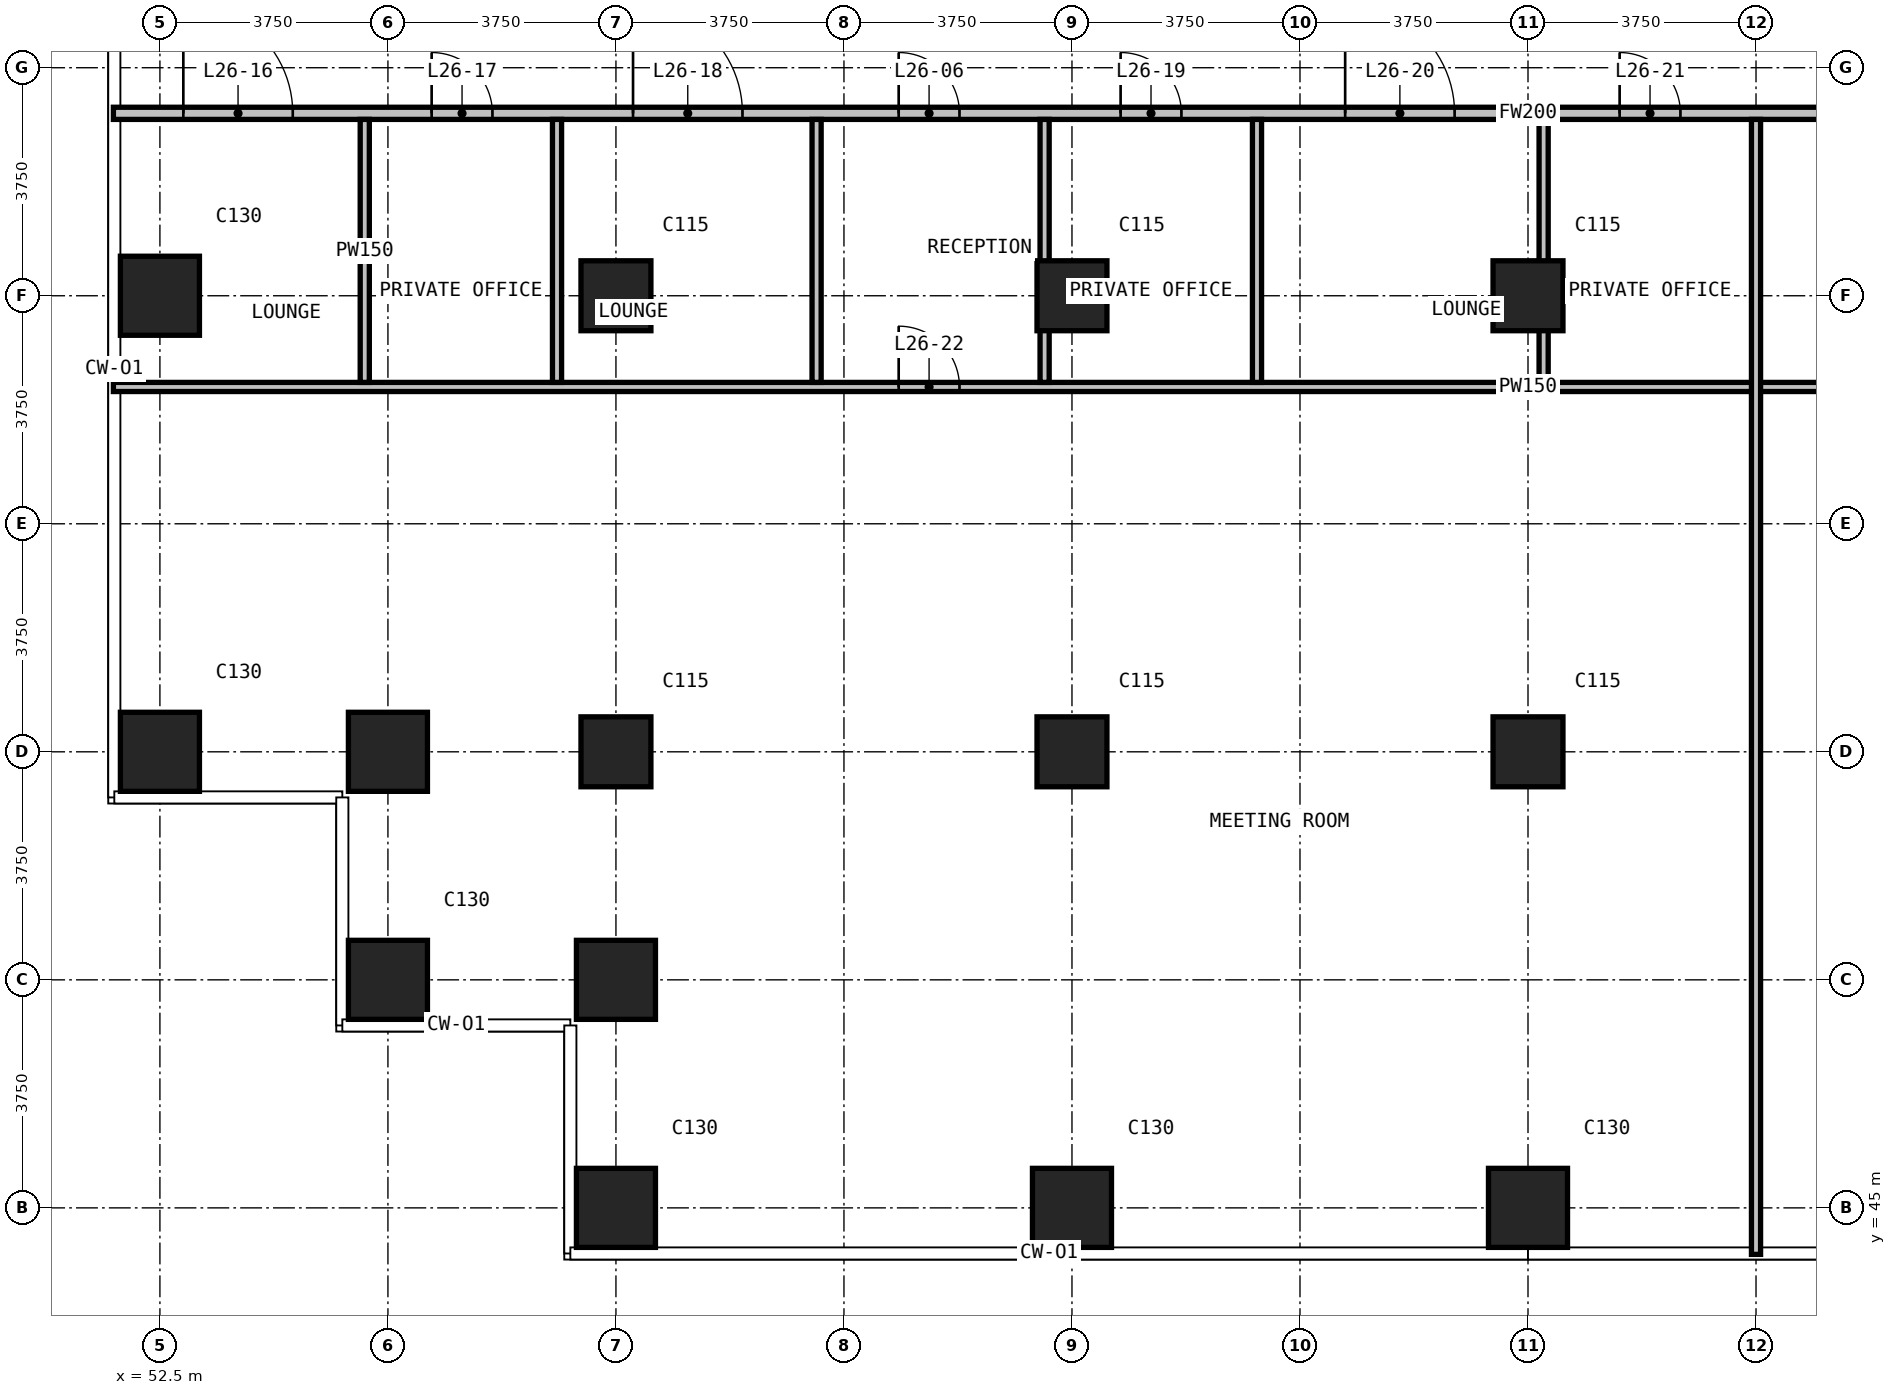
"""IFC4 building model, lengths in metres.
Left out: names, types, materials, properties, quantities, classifications, styles, units other than length and angle.
Written with IfcOpenShell. Run it as: python <this file> out.ifc"""

import sys

from ifc_helpers import new_model, si_unit, direction, frame, frame_2d, origin, origin_2d, place, context, subcontext, project, spatial, rectangle, extrude, element, fill, save


model = new_model("IFC4")
c1 = context("Model", 3, precision=1e-05, world=origin(), true_north=direction((0.0, 1.0)))
c2 = subcontext(c1, "Body", "Model", "MODEL_VIEW")
j1 = project(units=[si_unit("LENGTHUNIT", "METRE"), si_unit("PLANEANGLEUNIT", "RADIAN")], contexts=[c1])
p1 = place(None, origin())
s1 = spatial("IfcSite", under=j1, at=p1, CompositionType="ELEMENT")
p2 = place(p1, origin())
s2 = spatial("IfcBuilding", under=s1, at=p2, CompositionType="ELEMENT")
p3 = place(p2, frame((0.0, 0.0, 107.2)))
s3 = spatial("IfcBuildingStorey", under=s2, at=p3, CompositionType="ELEMENT", Elevation=107.2)
for number, where, z_axis, x_axis in (
    (1, (52.5, 52.5, 0.0), (0.0, 0.0, 1.0), (1.0, 0.0, 0.0)),
    (2, (52.5, 60.0, 0.0), (0.0, 0.0, 1.0), (1.0, 0.0, 0.0)),
    (3, (56.25, 48.75, 0.0), (0.0, 0.0, 1.0), (1.0, 0.0, 0.0)),
    (4, (56.25, 52.5, 0.0), (0.0, 0.0, 1.0), (1.0, 0.0, 0.0)),
    (5, (60.0, 45.0, 0.0), (0.0, 0.0, 1.0), (1.0, 0.0, 0.0)),
    (6, (60.0, 48.75, 0.0), (0.0, 0.0, 1.0), (1.0, 0.0, 0.0)),
):
    element("IfcColumn", number, at=place(p3, frame(where, z_axis=z_axis, x_axis=x_axis)), inside=s3, PredefinedType="COLUMN", context=c2, shape_type="SweptSolid", body=[
        extrude(rectangle(XDim=1.3, YDim=1.3, at=origin_2d()), origin(), (0.0, 0.0, 1.0), 3.6),
    ])
for number, where, z_axis, x_axis in (
    (7, (60.0, 52.5, 0.0), (0.0, 0.0, 1.0), (1.0, 0.0, 0.0)),
    (8, (60.0, 60.0, 0.0), (0.0, 0.0, 1.0), (1.0, 0.0, 0.0)),
):
    element("IfcColumn", number, at=place(p3, frame(where, z_axis=z_axis, x_axis=x_axis)), inside=s3, PredefinedType="COLUMN", context=c2, shape_type="SweptSolid", body=[
        extrude(rectangle(XDim=1.15, YDim=1.15, at=origin_2d()), origin(), (0.0, 0.0, 1.0), 3.6),
    ])
p4 = place(p3, frame((67.5, 45.0, 0.0), z_axis=(0.0, 0.0, 1.0), x_axis=(1.0, 0.0, 0.0)))
e9 = element("IfcColumn", 9, at=p4, inside=s3, PredefinedType="COLUMN", context=c2, shape_type="SweptSolid", body=[
    extrude(rectangle(XDim=1.3, YDim=1.3, at=origin_2d()), origin(), (0.0, 0.0, 1.0), 3.6),
])
for number, where, z_axis, x_axis in (
    (10, (67.5, 52.5, 0.0), (0.0, 0.0, 1.0), (1.0, 0.0, 0.0)),
    (11, (67.5, 60.0, 0.0), (0.0, 0.0, 1.0), (1.0, 0.0, 0.0)),
):
    element("IfcColumn", number, at=place(p3, frame(where, z_axis=z_axis, x_axis=x_axis)), inside=s3, PredefinedType="COLUMN", context=c2, shape_type="SweptSolid", body=[
        extrude(rectangle(XDim=1.15, YDim=1.15, at=origin_2d()), origin(), (0.0, 0.0, 1.0), 3.6),
    ])
p5 = place(p3, frame((75.0, 45.0, 0.0), z_axis=(0.0, 0.0, 1.0), x_axis=(1.0, 0.0, 0.0)))
e12 = element("IfcColumn", 12, at=p5, inside=s3, PredefinedType="COLUMN", context=c2, shape_type="SweptSolid", body=[
    extrude(rectangle(XDim=1.3, YDim=1.3, at=origin_2d()), origin(), (0.0, 0.0, 1.0), 3.6),
])
for number, where, z_axis, x_axis in (
    (13, (75.0, 52.5, 0.0), (0.0, 0.0, 1.0), (1.0, 0.0, 0.0)),
    (14, (75.0, 60.0, 0.0), (0.0, 0.0, 1.0), (1.0, 0.0, 0.0)),
):
    element("IfcColumn", number, at=place(p3, frame(where, z_axis=z_axis, x_axis=x_axis)), inside=s3, PredefinedType="COLUMN", context=c2, shape_type="SweptSolid", body=[
        extrude(rectangle(XDim=1.15, YDim=1.15, at=origin_2d()), origin(), (0.0, 0.0, 1.0), 3.6),
    ])
p6 = place(p3, frame((51.735, 63.0, 0.0), z_axis=(0.0, 0.0, 1.0), x_axis=(1.0, 0.0, 0.0)))
e15 = element("IfcWall", 15, at=p6, inside=s3, PredefinedType="PARTITIONING", context=c2, shape_type="SweptSolid", body=[
    extrude(rectangle(XDim=46.53, YDim=0.2, at=frame_2d((23.265, 0.0))), origin(), (0.0, 0.0, 1.0), 3.3),
])
p7 = place(p6, frame((12.915, 0.0, 0.0)))
e16 = element("IfcOpeningElement", 16, at=p7, cuts=e15, PredefinedType="OPENING", context=c2, shape_type="SweptSolid", body=[
    extrude(rectangle(XDim=1.0, YDim=2.2, at=frame_2d((0.5, 1.1))), frame((0.0, 0.11, 0.0), z_axis=(0.0, -1.0, 0.0), x_axis=(1.0, 0.0, 0.0)), (0.0, 0.0, 1.0), 0.22),
])
p8 = place(p6, frame((28.365, 0.0, 0.0)))
e17 = element("IfcOpeningElement", 17, at=p8, cuts=e15, PredefinedType="OPENING", context=c2, shape_type="SweptSolid", body=[
    extrude(rectangle(XDim=1.0, YDim=2.2, at=frame_2d((0.5, 1.1))), frame((0.0, 0.11, 0.0), z_axis=(0.0, -1.0, 0.0), x_axis=(1.0, 0.0, 0.0)), (0.0, 0.0, 1.0), 0.22),
])
p9 = place(p6, frame((31.965, 0.0, 0.0)))
e18 = element("IfcOpeningElement", 18, at=p9, cuts=e15, PredefinedType="OPENING", context=c2, shape_type="SweptSolid", body=[
    extrude(rectangle(XDim=1.0, YDim=2.2, at=frame_2d((0.5, 1.1))), frame((0.0, 0.11, 0.0), z_axis=(0.0, -1.0, 0.0), x_axis=(1.0, 0.0, 0.0)), (0.0, 0.0, 1.0), 0.22),
])
p10 = place(p6, frame((41.429, 0.0, 0.0)))
e19 = element("IfcOpeningElement", 19, at=p10, cuts=e15, PredefinedType="OPENING", context=c2, shape_type="SweptSolid", body=[
    extrude(rectangle(XDim=1.0, YDim=2.2, at=frame_2d((0.5, 1.1))), frame((0.0, 0.11, 0.0), z_axis=(0.0, -1.0, 0.0), x_axis=(1.0, 0.0, 0.0)), (0.0, 0.0, 1.0), 0.22),
])
p11 = place(p6, frame((1.15, 0.0, 0.0)))
e20 = element("IfcOpeningElement", 20, at=p11, cuts=e15, PredefinedType="OPENING", context=c2, shape_type="SweptSolid", body=[
    extrude(rectangle(XDim=1.8, YDim=2.2, at=frame_2d((0.9, 1.1))), frame((0.0, 0.11, 0.0), z_axis=(0.0, -1.0, 0.0), x_axis=(1.0, 0.0, 0.0)), (0.0, 0.0, 1.0), 0.22),
])
p12 = place(p6, frame((5.234, 0.0, 0.0)))
e21 = element("IfcOpeningElement", 21, at=p12, cuts=e15, PredefinedType="OPENING", context=c2, shape_type="SweptSolid", body=[
    extrude(rectangle(XDim=1.0, YDim=2.2, at=frame_2d((0.5, 1.1))), frame((0.0, 0.11, 0.0), z_axis=(0.0, -1.0, 0.0), x_axis=(1.0, 0.0, 0.0)), (0.0, 0.0, 1.0), 0.22),
])
p13 = place(p6, frame((8.546, 0.0, 0.0)))
e22 = element("IfcOpeningElement", 22, at=p13, cuts=e15, PredefinedType="OPENING", context=c2, shape_type="SweptSolid", body=[
    extrude(rectangle(XDim=1.8, YDim=2.2, at=frame_2d((0.9, 1.1))), frame((0.0, 0.11, 0.0), z_axis=(0.0, -1.0, 0.0), x_axis=(1.0, 0.0, 0.0)), (0.0, 0.0, 1.0), 0.22),
])
p14 = place(p6, frame((16.565, 0.0, 0.0)))
e23 = element("IfcOpeningElement", 23, at=p14, cuts=e15, PredefinedType="OPENING", context=c2, shape_type="SweptSolid", body=[
    extrude(rectangle(XDim=1.0, YDim=2.2, at=frame_2d((0.5, 1.1))), frame((0.0, 0.11, 0.0), z_axis=(0.0, -1.0, 0.0), x_axis=(1.0, 0.0, 0.0)), (0.0, 0.0, 1.0), 0.22),
])
p15 = place(p6, frame((20.258, 0.0, 0.0)))
e24 = element("IfcOpeningElement", 24, at=p15, cuts=e15, PredefinedType="OPENING", context=c2, shape_type="SweptSolid", body=[
    extrude(rectangle(XDim=1.8, YDim=2.2, at=frame_2d((0.9, 1.1))), frame((0.0, 0.11, 0.0), z_axis=(0.0, -1.0, 0.0), x_axis=(1.0, 0.0, 0.0)), (0.0, 0.0, 1.0), 0.22),
])
p16 = place(p6, frame((24.772, 0.0, 0.0)))
e25 = element("IfcOpeningElement", 25, at=p16, cuts=e15, PredefinedType="OPENING", context=c2, shape_type="SweptSolid", body=[
    extrude(rectangle(XDim=1.0, YDim=2.2, at=frame_2d((0.5, 1.1))), frame((0.0, 0.11, 0.0), z_axis=(0.0, -1.0, 0.0), x_axis=(1.0, 0.0, 0.0)), (0.0, 0.0, 1.0), 0.22),
])
p17 = place(p6, frame((35.172, 0.0, 0.0)))
e26 = element("IfcOpeningElement", 26, at=p17, cuts=e15, PredefinedType="OPENING", context=c2, shape_type="SweptSolid", body=[
    extrude(rectangle(XDim=1.0, YDim=2.2, at=frame_2d((0.5, 1.1))), frame((0.0, 0.11, 0.0), z_axis=(0.0, -1.0, 0.0), x_axis=(1.0, 0.0, 0.0)), (0.0, 0.0, 1.0), 0.22),
])
p18 = place(p6, frame((38.201, 0.0, 0.0)))
e27 = element("IfcOpeningElement", 27, at=p18, cuts=e15, PredefinedType="OPENING", context=c2, shape_type="SweptSolid", body=[
    extrude(rectangle(XDim=1.0, YDim=2.2, at=frame_2d((0.5, 1.1))), frame((0.0, 0.11, 0.0), z_axis=(0.0, -1.0, 0.0), x_axis=(1.0, 0.0, 0.0)), (0.0, 0.0, 1.0), 0.22),
])
p19 = place(p6, frame((44.586, 0.0, 0.0)))
e28 = element("IfcOpeningElement", 28, at=p19, cuts=e15, PredefinedType="OPENING", context=c2, shape_type="SweptSolid", body=[
    extrude(rectangle(XDim=1.0, YDim=2.2, at=frame_2d((0.5, 1.1))), frame((0.0, 0.11, 0.0), z_axis=(0.0, -1.0, 0.0), x_axis=(1.0, 0.0, 0.0)), (0.0, 0.0, 1.0), 0.22),
])
p20 = place(p3, frame((51.735, 58.5, 0.0), z_axis=(0.0, 0.0, 1.0), x_axis=(1.0, 0.0, 0.0)))
e29 = element("IfcWall", 29, at=p20, inside=s3, PredefinedType="PARTITIONING", context=c2, shape_type="SweptSolid", body=[
    extrude(rectangle(XDim=46.53, YDim=0.15, at=frame_2d((23.265, 0.0))), origin(), (0.0, 0.0, 1.0), 3.3),
])
p21 = place(p20, frame((12.915, 0.0, 0.0)))
e30 = element("IfcOpeningElement", 30, at=p21, cuts=e29, PredefinedType="OPENING", context=c2, shape_type="SweptSolid", body=[
    extrude(rectangle(XDim=1.0, YDim=2.2, at=frame_2d((0.5, 1.1))), frame((0.0, 0.085, 0.0), z_axis=(0.0, -1.0, 0.0), x_axis=(1.0, 0.0, 0.0)), (0.0, 0.0, 1.0), 0.17),
])
p22 = place(p20, frame((28.365, 0.0, 0.0)))
e31 = element("IfcOpeningElement", 31, at=p22, cuts=e29, PredefinedType="OPENING", context=c2, shape_type="SweptSolid", body=[
    extrude(rectangle(XDim=1.0, YDim=2.2, at=frame_2d((0.5, 1.1))), frame((0.0, 0.085, 0.0), z_axis=(0.0, -1.0, 0.0), x_axis=(1.0, 0.0, 0.0)), (0.0, 0.0, 1.0), 0.17),
])
for number, where, z_axis, x_axis in (
    (32, (55.869, 58.575, 0.0), (0.0, 0.0, 1.0), (0.0, 1.0, 0.0)),
    (33, (59.031, 58.575, 0.0), (0.0, 0.0, 1.0), (0.0, 1.0, 0.0)),
    (34, (63.3, 58.575, 0.0), (0.0, 0.0, 1.0), (0.0, 1.0, 0.0)),
    (35, (67.05, 58.575, 0.0), (0.0, 0.0, 1.0), (0.0, 1.0, 0.0)),
    (36, (70.543, 58.575, 0.0), (0.0, 0.0, 1.0), (0.0, 1.0, 0.0)),
    (37, (75.257, 58.575, 0.0), (0.0, 0.0, 1.0), (0.0, 1.0, 0.0)),
):
    element("IfcWall", number, at=place(p3, frame(where, z_axis=z_axis, x_axis=x_axis)), inside=s3, PredefinedType="PARTITIONING", context=c2, shape_type="SweptSolid", body=[
        extrude(rectangle(XDim=4.325, YDim=0.15, at=frame_2d((2.163, 0.0))), origin(), (0.0, 0.0, 1.0), 3.3),
    ])
p23 = place(p3, frame((78.75, 44.235, 0.0), z_axis=(0.0, 0.0, 1.0), x_axis=(0.0, 1.0, 0.0)))
e38 = element("IfcWall", 38, at=p23, inside=s3, PredefinedType="PARTITIONING", context=c2, shape_type="SweptSolid", body=[
    extrude(rectangle(XDim=18.665, YDim=0.15, at=frame_2d((9.333, 0.0))), origin(), (0.0, 0.0, 1.0), 3.3),
])
p24 = place(p7, origin())
e39 = element("IfcDoor", 39, at=p24, inside=s3, OperationType="SINGLE_SWING_LEFT", PredefinedType="DOOR", context=c2, shape_type="SweptSolid", body=[
    extrude(rectangle(XDim=1.0, YDim=2.2, at=frame_2d((0.5, 1.1))), frame((0.0, 0.025, 0.0), z_axis=(0.0, -1.0, 0.0), x_axis=(1.0, 0.0, 0.0)), (0.0, 0.0, 1.0), 0.05),
])
fill(e16, e39)
p25 = place(p11, origin())
e40 = element("IfcDoor", 40, at=p25, inside=s3, OperationType="DOUBLE_DOOR_SINGLE_SWING", PredefinedType="DOOR", context=c2, shape_type="SweptSolid", body=[
    extrude(rectangle(XDim=1.8, YDim=2.2, at=frame_2d((0.9, 1.1))), frame((0.0, 0.025, 0.0), z_axis=(0.0, -1.0, 0.0), x_axis=(1.0, 0.0, 0.0)), (0.0, 0.0, 1.0), 0.05),
])
fill(e20, e40)
p26 = place(p12, origin())
e41 = element("IfcDoor", 41, at=p26, inside=s3, OperationType="SINGLE_SWING_LEFT", PredefinedType="DOOR", context=c2, shape_type="SweptSolid", body=[
    extrude(rectangle(XDim=1.0, YDim=2.2, at=frame_2d((0.5, 1.1))), frame((0.0, 0.025, 0.0), z_axis=(0.0, -1.0, 0.0), x_axis=(1.0, 0.0, 0.0)), (0.0, 0.0, 1.0), 0.05),
])
fill(e21, e41)
p27 = place(p13, origin())
e42 = element("IfcDoor", 42, at=p27, inside=s3, OperationType="DOUBLE_DOOR_SINGLE_SWING", PredefinedType="DOOR", context=c2, shape_type="SweptSolid", body=[
    extrude(rectangle(XDim=1.8, YDim=2.2, at=frame_2d((0.9, 1.1))), frame((0.0, 0.025, 0.0), z_axis=(0.0, -1.0, 0.0), x_axis=(1.0, 0.0, 0.0)), (0.0, 0.0, 1.0), 0.05),
])
fill(e22, e42)
p28 = place(p14, origin())
e43 = element("IfcDoor", 43, at=p28, inside=s3, OperationType="SINGLE_SWING_LEFT", PredefinedType="DOOR", context=c2, shape_type="SweptSolid", body=[
    extrude(rectangle(XDim=1.0, YDim=2.2, at=frame_2d((0.5, 1.1))), frame((0.0, 0.025, 0.0), z_axis=(0.0, -1.0, 0.0), x_axis=(1.0, 0.0, 0.0)), (0.0, 0.0, 1.0), 0.05),
])
fill(e23, e43)
p29 = place(p15, origin())
e44 = element("IfcDoor", 44, at=p29, inside=s3, OperationType="DOUBLE_DOOR_SINGLE_SWING", PredefinedType="DOOR", context=c2, shape_type="SweptSolid", body=[
    extrude(rectangle(XDim=1.8, YDim=2.2, at=frame_2d((0.9, 1.1))), frame((0.0, 0.025, 0.0), z_axis=(0.0, -1.0, 0.0), x_axis=(1.0, 0.0, 0.0)), (0.0, 0.0, 1.0), 0.05),
])
fill(e24, e44)
p30 = place(p16, origin())
e45 = element("IfcDoor", 45, at=p30, inside=s3, OperationType="SINGLE_SWING_LEFT", PredefinedType="DOOR", context=c2, shape_type="SweptSolid", body=[
    extrude(rectangle(XDim=1.0, YDim=2.2, at=frame_2d((0.5, 1.1))), frame((0.0, 0.025, 0.0), z_axis=(0.0, -1.0, 0.0), x_axis=(1.0, 0.0, 0.0)), (0.0, 0.0, 1.0), 0.05),
])
fill(e25, e45)
p31 = place(p21, origin())
e46 = element("IfcDoor", 46, at=p31, inside=s3, OperationType="SINGLE_SWING_LEFT", PredefinedType="DOOR", context=c2, shape_type="SweptSolid", body=[
    extrude(rectangle(XDim=1.0, YDim=2.2, at=frame_2d((0.5, 1.1))), frame((0.0, 0.025, 0.0), z_axis=(0.0, -1.0, 0.0), x_axis=(1.0, 0.0, 0.0)), (0.0, 0.0, 1.0), 0.05),
])
fill(e30, e46)
save(model, sys.argv[1])
